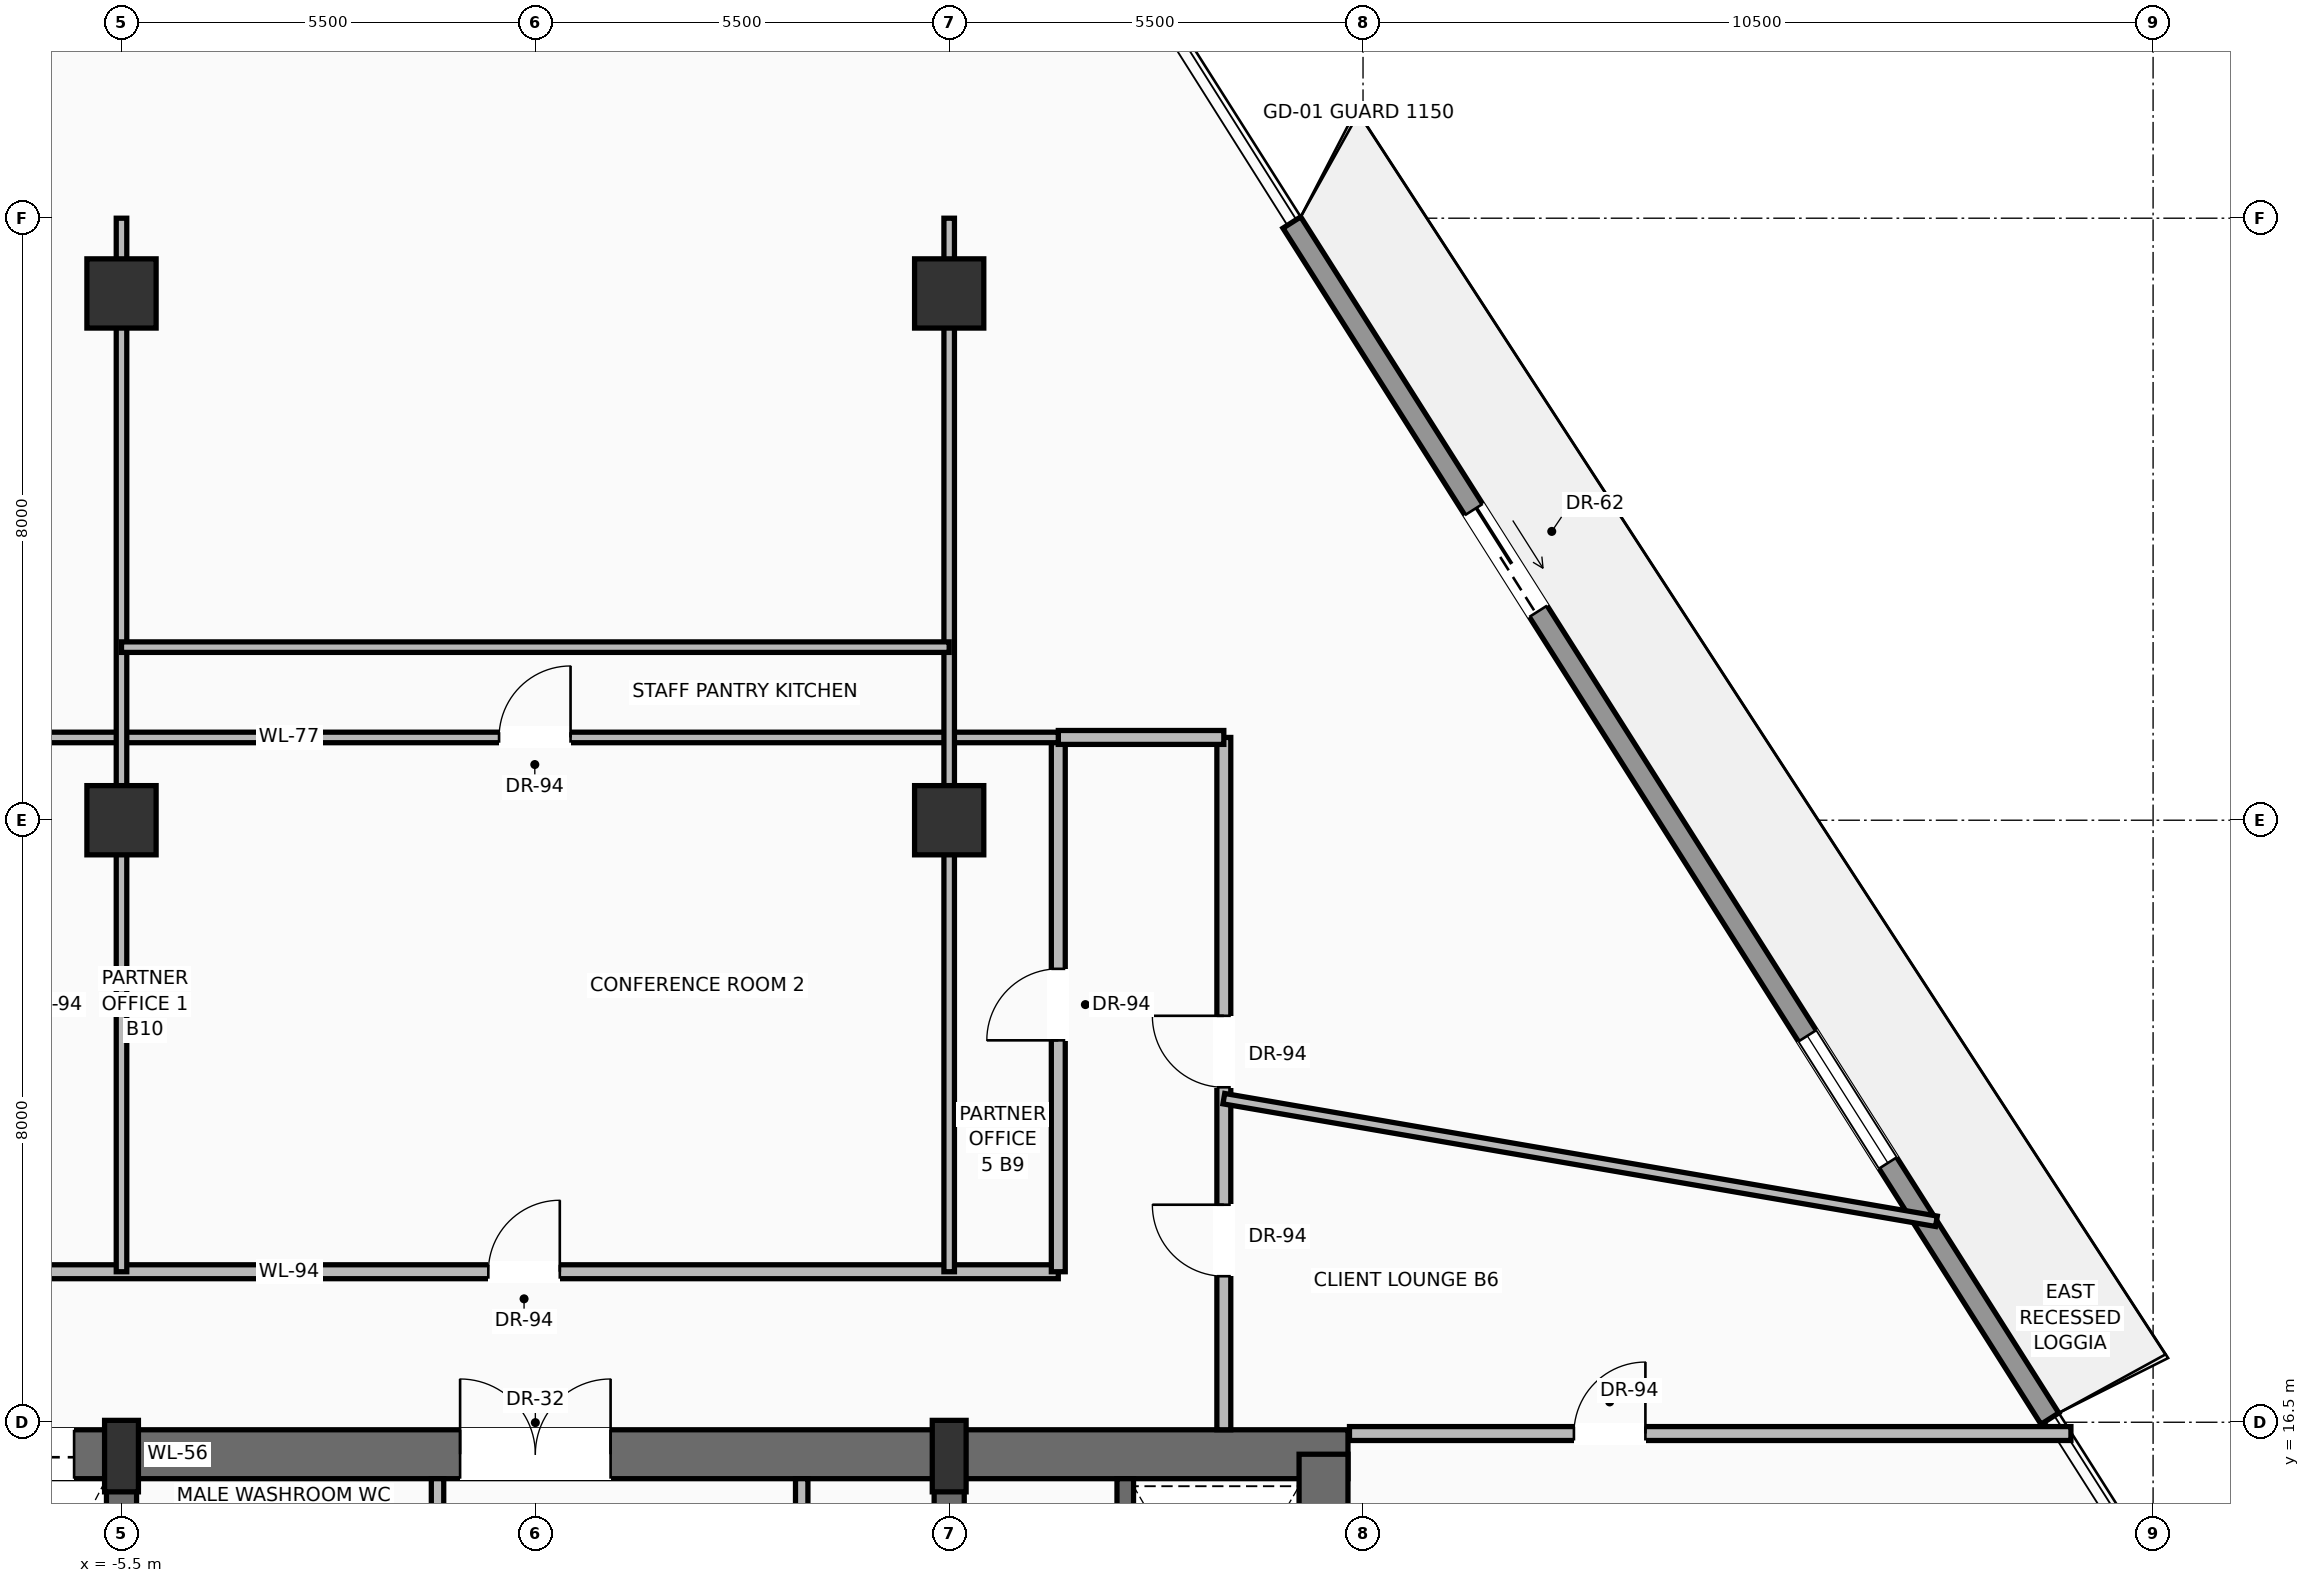
"""IFC4 building model, lengths in metres.
Left out: names, types, materials, properties, quantities, classifications, styles, units other than length and angle.
Written with IfcOpenShell. Run it as: python <this file> out.ifc"""

import sys

from ifc_helpers import new_model, si_unit, direction, frame, frame_2d, origin, origin_2d, place, context, subcontext, project, spatial, rectangle, extrude, source, transform, mapped, element, fill, save


model = new_model("IFC4")
c1 = context("Model", 3, precision=1e-05, world=origin(), true_north=direction((0.0, 1.0)))
c2 = subcontext(c1, "Body", "Model", "MODEL_VIEW")
j1 = project(units=[si_unit("LENGTHUNIT", "METRE"), si_unit("PLANEANGLEUNIT", "RADIAN")], contexts=[c1])
p1 = place(None, origin())
s1 = spatial("IfcSite", under=j1, at=p1, CompositionType="ELEMENT")
p2 = place(p1, origin())
s2 = spatial("IfcBuilding", under=s1, at=p2, CompositionType="ELEMENT")
p3 = place(p2, frame((0.0, 0.0, 182.1)))
s3 = spatial("IfcBuildingStorey", under=s2, at=p3, CompositionType="ELEMENT", Elevation=182.1)
p4 = place(p3, frame((-10.8, 16.075, 0.0), z_axis=(0.0, 0.0, 1.0), x_axis=(1.0, 0.0, 0.0)))
e1 = element("IfcWall", 1, at=p4, inside=s3, PredefinedType="SHEAR", context=c2, shape_type="SweptSolid", body=[
    extrude(rectangle(XDim=21.6, YDim=0.65, at=frame_2d((10.8, 0.0))), origin(), (0.0, 0.0, 1.0), 3.47),
])
p5 = place(p4, frame((3.37, 0.0, 0.0)))
e2 = element("IfcOpeningElement", 2, at=p5, cuts=e1, PredefinedType="OPENING", context=c2, shape_type="SweptSolid", body=[
    extrude(rectangle(XDim=1.3, YDim=2.3, at=frame_2d((0.65, 1.15))), frame((0.0, 0.335, 0.0), z_axis=(0.0, -1.0, 0.0), x_axis=(1.0, 0.0, 0.0)), (0.0, 0.0, 1.0), 0.67),
])
p6 = place(p4, frame((9.8, 0.0, 0.0)))
e3 = element("IfcOpeningElement", 3, at=p6, cuts=e1, PredefinedType="OPENING", context=c2, shape_type="SweptSolid", body=[
    extrude(rectangle(XDim=2.0, YDim=2.4, at=frame_2d((1.0, 1.2))), frame((0.0, 0.335, 0.0), z_axis=(0.0, -1.0, 0.0), x_axis=(1.0, 0.0, 0.0)), (0.0, 0.0, 1.0), 0.67),
])
p7 = place(p3, frame((10.475, 0.525, 0.0), z_axis=(0.0, 0.0, 1.0), x_axis=(0.0, 1.0, 0.0)))
e4 = element("IfcWall", 4, at=p7, inside=s3, PredefinedType="SHEAR", context=c2, shape_type="SweptSolid", body=[
    extrude(rectangle(XDim=15.55, YDim=0.65, at=frame_2d((7.775, 0.0))), origin(), (0.0, 0.0, 1.0), 3.47),
])
p8 = place(p3, frame((-5.5, 0.525, 0.0), z_axis=(0.0, 0.0, 1.0), x_axis=(0.0, 1.0, 0.0)))
e5 = element("IfcWall", 5, at=p8, inside=s3, PredefinedType="SHEAR", context=c2, shape_type="SweptSolid", body=[
    extrude(rectangle(XDim=15.55, YDim=0.4, at=frame_2d((7.775, 0.0))), origin(), (0.0, 0.0, 1.0), 3.47),
])
p9 = place(p8, frame((8.975, 0.0, 0.0)))
e6 = element("IfcOpeningElement", 6, at=p9, cuts=e5, PredefinedType="OPENING", context=c2, shape_type="SweptSolid", body=[
    extrude(rectangle(XDim=1.1, YDim=2.2, at=frame_2d((0.55, 1.1))), frame((0.0, 0.21, 0.0), z_axis=(0.0, -1.0, 0.0), x_axis=(1.0, 0.0, 0.0)), (0.0, 0.0, 1.0), 0.42),
])
p10 = place(p3, frame((5.5, 0.525, 0.0), z_axis=(0.0, 0.0, 1.0), x_axis=(0.0, 1.0, 0.0)))
e7 = element("IfcWall", 7, at=p10, inside=s3, PredefinedType="SHEAR", context=c2, shape_type="SweptSolid", body=[
    extrude(rectangle(XDim=15.55, YDim=0.4, at=frame_2d((7.775, 0.0))), origin(), (0.0, 0.0, 1.0), 3.47),
])
p11 = place(p10, frame((8.975, 0.0, 0.0)))
e8 = element("IfcOpeningElement", 8, at=p11, cuts=e7, PredefinedType="OPENING", context=c2, shape_type="SweptSolid", body=[
    extrude(rectangle(XDim=1.1, YDim=2.2, at=frame_2d((0.55, 1.1))), frame((0.0, 0.21, 0.0), z_axis=(0.0, -1.0, 0.0), x_axis=(1.0, 0.0, 0.0)), (0.0, 0.0, 1.0), 0.42),
])
m1 = source(origin(), c2, "Body", "SweptSolid", [
    extrude(rectangle(XDim=0.45, YDim=0.95, at=origin_2d()), origin(), (0.0, 0.0, 1.0), 3.7),
])
for number, where, z_axis, x_axis in (
    (9, (-5.5, 16.05, 0.0), (0.0, 0.0, 1.0), (1.0, 0.0, 0.0)),
    (10, (5.5, 16.05, 0.0), (0.0, 0.0, 1.0), (1.0, 0.0, 0.0)),
):
    element("IfcColumn", number, at=place(p3, frame(where, z_axis=z_axis, x_axis=x_axis)), inside=s3, PredefinedType="PILASTER", context=c2, shape_type="MappedRepresentation", body=[
        mapped(m1, transform((0.0, 0.0, 0.0), scale=1.0)),
    ])
m2 = source(origin(), c2, "Body", "SweptSolid", [
    extrude(rectangle(XDim=0.92, YDim=0.92, at=origin_2d()), origin(), (0.0, 0.0, 1.0), 3.7),
])
for number, where, z_axis, x_axis in (
    (11, (-5.5, 24.5, 0.0), (0.0, 0.0, 1.0), (1.0, 0.0, 0.0)),
    (12, (5.5, 24.5, 0.0), (0.0, 0.0, 1.0), (1.0, 0.0, 0.0)),
    (13, (-5.5, 31.5, 0.0), (0.0, 0.0, 1.0), (1.0, 0.0, 0.0)),
    (14, (5.5, 31.5, 0.0), (0.0, 0.0, 1.0), (1.0, 0.0, 0.0)),
):
    element("IfcColumn", number, at=place(p3, frame(where, z_axis=z_axis, x_axis=x_axis)), inside=s3, PredefinedType="COLUMN", context=c2, shape_type="MappedRepresentation", body=[
        mapped(m2, transform((0.0, 0.0, 0.0), scale=1.0)),
    ])
p12 = place(p3, frame((10.054, 32.443, 0.0), z_axis=(0.0, 0.0, 1.0), x_axis=(0.535358537379, -0.844624908735, 0.0)))
e15 = element("IfcWall", 15, at=p12, inside=s3, PredefinedType="SOLIDWALL", context=c2, shape_type="SweptSolid", body=[
    extrude(rectangle(XDim=18.818, YDim=0.28, at=frame_2d((9.409, 0.0))), origin(), (0.0, 0.0, 1.0), 3.05),
])
p13 = place(p12, frame((4.516, 0.0, 0.0)))
e16 = element("IfcOpeningElement", 16, at=p13, cuts=e15, PredefinedType="OPENING", context=c2, shape_type="SweptSolid", body=[
    extrude(rectangle(XDim=1.6, YDim=2.35, at=frame_2d((0.8, 1.175))), frame((0.0, 0.15, 0.0), z_axis=(0.0, -1.0, 0.0), x_axis=(1.0, 0.0, 0.0)), (0.0, 0.0, 1.0), 0.3),
])
p14 = place(p12, frame((12.796, 0.0, 0.9)))
e17 = element("IfcOpeningElement", 17, at=p14, cuts=e15, PredefinedType="OPENING", context=c2, shape_type="SweptSolid", body=[
    extrude(rectangle(XDim=2.0, YDim=1.85, at=frame_2d((1.0, 0.925))), frame((0.0, 0.15, 0.0), z_axis=(0.0, -1.0, 0.0), x_axis=(1.0, 0.0, 0.0)), (0.0, 0.0, 1.0), 0.3),
])
p15 = place(p3, frame((7.84, 11.87, 0.0), z_axis=(0.0, 0.0, 1.0), x_axis=(0.0, 1.0, 0.0)))
e18 = element("IfcWall", 18, at=p15, inside=s3, PredefinedType="SOLIDWALL", context=c2, shape_type="SweptSolid", body=[
    extrude(rectangle(XDim=3.88, YDim=0.22, at=frame_2d((1.94, 0.0))), origin(), (0.0, 0.0, 1.0), 3.47),
])
p16 = place(p3, frame((-1.3, 13.6, 0.0), z_axis=(0.0, 0.0, 1.0), x_axis=(0.0, 1.0, 0.0)))
e19 = element("IfcWall", 19, at=p16, inside=s3, PredefinedType="PARTITIONING", context=c2, shape_type="SweptSolid", body=[
    extrude(rectangle(XDim=2.15, YDim=0.165, at=frame_2d((1.075, 0.0))), origin(), (0.0, 0.0, 1.0), 3.462),
])
p17 = place(p16, frame((0.55, 0.0, 0.0)))
e20 = element("IfcOpeningElement", 20, at=p17, cuts=e19, PredefinedType="OPENING", context=c2, shape_type="SweptSolid", body=[
    extrude(rectangle(XDim=0.9, YDim=2.1, at=frame_2d((0.45, 1.05))), frame((0.0, 0.093, 0.0), z_axis=(0.0, -1.0, 0.0), x_axis=(1.0, 0.0, 0.0)), (0.0, 0.0, 1.0), 0.185),
])
p18 = place(p3, frame((3.54, 11.22, 0.0), z_axis=(0.0, 0.0, 1.0), x_axis=(0.0, 1.0, 0.0)))
e21 = element("IfcWall", 21, at=p18, inside=s3, PredefinedType="PARTITIONING", context=c2, shape_type="SweptSolid", body=[
    extrude(rectangle(XDim=4.53, YDim=0.165, at=frame_2d((2.265, 0.0))), origin(), (0.0, 0.0, 1.0), 3.462),
])
p19 = place(p18, frame((1.25, 0.0, 0.0)))
e22 = element("IfcOpeningElement", 22, at=p19, cuts=e21, PredefinedType="OPENING", context=c2, shape_type="SweptSolid", body=[
    extrude(rectangle(XDim=0.9, YDim=2.1, at=frame_2d((0.45, 1.05))), frame((0.0, 0.093, 0.0), z_axis=(0.0, -1.0, 0.0), x_axis=(1.0, 0.0, 0.0)), (0.0, 0.0, 1.0), 0.185),
])
p20 = place(p3, frame((-7.25, 18.5, 0.0), z_axis=(0.0, 0.0, 1.0), x_axis=(1.0, 0.0, 0.0)))
e23 = element("IfcWall", 23, at=p20, inside=s3, PredefinedType="PARTITIONING", context=c2, shape_type="SweptSolid", body=[
    extrude(rectangle(XDim=14.2, YDim=0.185, at=frame_2d((7.1, 0.0))), origin(), (0.0, 0.0, 1.0), 2.846),
])
p21 = place(p20, frame((6.625, 0.0, 0.0)))
e24 = element("IfcOpeningElement", 24, at=p21, cuts=e23, PredefinedType="OPENING", context=c2, shape_type="SweptSolid", body=[
    extrude(rectangle(XDim=0.95, YDim=2.2, at=frame_2d((0.475, 1.1))), frame((0.0, 0.103, 0.0), z_axis=(0.0, -1.0, 0.0), x_axis=(1.0, 0.0, 0.0)), (0.0, 0.0, 1.0), 0.205),
])
p22 = place(p3, frame((6.95, 18.5, 0.0), z_axis=(0.0, 0.0, 1.0), x_axis=(0.0, 1.0, 0.0)))
e25 = element("IfcWall", 25, at=p22, inside=s3, PredefinedType="PARTITIONING", context=c2, shape_type="SweptSolid", body=[
    extrude(rectangle(XDim=7.1, YDim=0.185, at=frame_2d((3.55, 0.0))), origin(), (0.0, 0.0, 1.0), 2.846),
])
p23 = place(p22, frame((3.075, 0.0, 0.0)))
e26 = element("IfcOpeningElement", 26, at=p23, cuts=e25, PredefinedType="OPENING", context=c2, shape_type="SweptSolid", body=[
    extrude(rectangle(XDim=0.95, YDim=2.2, at=frame_2d((0.475, 1.1))), frame((0.0, 0.103, 0.0), z_axis=(0.0, -1.0, 0.0), x_axis=(1.0, 0.0, 0.0)), (0.0, 0.0, 1.0), 0.205),
])
p24 = place(p3, frame((9.15, 16.4, 0.0), z_axis=(0.0, 0.0, 1.0), x_axis=(0.0, 1.0, 0.0)))
e27 = element("IfcWall", 27, at=p24, inside=s3, PredefinedType="PARTITIONING", context=c2, shape_type="SweptSolid", body=[
    extrude(rectangle(XDim=9.2, YDim=0.185, at=frame_2d((4.6, 0.0))), origin(), (0.0, 0.0, 1.0), 2.846),
])
p25 = place(p24, frame((4.551, 0.0, 0.0)))
e28 = element("IfcOpeningElement", 28, at=p25, cuts=e27, PredefinedType="OPENING", context=c2, shape_type="SweptSolid", body=[
    extrude(rectangle(XDim=0.95, YDim=2.2, at=frame_2d((0.475, 1.1))), frame((0.0, 0.103, 0.0), z_axis=(0.0, -1.0, 0.0), x_axis=(1.0, 0.0, 0.0)), (0.0, 0.0, 1.0), 0.205),
])
p26 = place(p24, frame((2.041, 0.0, 0.0)))
e29 = element("IfcOpeningElement", 29, at=p26, cuts=e27, PredefinedType="OPENING", context=c2, shape_type="SweptSolid", body=[
    extrude(rectangle(XDim=0.95, YDim=2.2, at=frame_2d((0.475, 1.1))), frame((0.0, 0.103, 0.0), z_axis=(0.0, -1.0, 0.0), x_axis=(1.0, 0.0, 0.0)), (0.0, 0.0, 1.0), 0.205),
])
p27 = place(p3, frame((6.95, 25.6, 0.0), z_axis=(0.0, 0.0, 1.0), x_axis=(1.0, 0.0, 0.0)))
e30 = element("IfcWall", 30, at=p27, inside=s3, PredefinedType="PARTITIONING", context=c2, shape_type="SweptSolid", body=[
    extrude(rectangle(XDim=2.2, YDim=0.185, at=frame_2d((1.1, 0.0))), origin(), (0.0, 0.0, 1.0), 3.462),
])
p28 = place(p3, frame((10.82, 16.35, 0.0), z_axis=(0.0, 0.0, 1.0), x_axis=(1.0, 0.0, 0.0)))
e31 = element("IfcWall", 31, at=p28, inside=s3, PredefinedType="PARTITIONING", context=c2, shape_type="SweptSolid", body=[
    extrude(rectangle(XDim=9.588, YDim=0.185, at=frame_2d((4.794, 0.0))), origin(), (0.0, 0.0, 1.0), 3.462),
])
p29 = place(p28, frame((2.983, 0.0, 0.0)))
e32 = element("IfcOpeningElement", 32, at=p29, cuts=e31, PredefinedType="OPENING", context=c2, shape_type="SweptSolid", body=[
    extrude(rectangle(XDim=0.95, YDim=2.2, at=frame_2d((0.475, 1.1))), frame((0.0, 0.103, 0.0), z_axis=(0.0, -1.0, 0.0), x_axis=(1.0, 0.0, 0.0)), (0.0, 0.0, 1.0), 0.205),
])
p30 = place(p3, frame((-7.25, 25.6, 0.0), z_axis=(0.0, 0.0, 1.0), x_axis=(1.0, 0.0, 0.0)))
e33 = element("IfcWall", 33, at=p30, inside=s3, PredefinedType="PARTITIONING", context=c2, shape_type="SweptSolid", body=[
    extrude(rectangle(XDim=14.2, YDim=0.14, at=frame_2d((7.1, 0.0))), origin(), (0.0, 0.0, 1.0), 3.462),
])
p31 = place(p30, frame((6.768, 0.0, 0.0)))
e34 = element("IfcOpeningElement", 34, at=p31, cuts=e33, PredefinedType="OPENING", context=c2, shape_type="SweptSolid", body=[
    extrude(rectangle(XDim=0.95, YDim=2.2, at=frame_2d((0.475, 1.1))), frame((0.0, 0.08, 0.0), z_axis=(0.0, -1.0, 0.0), x_axis=(1.0, 0.0, 0.0)), (0.0, 0.0, 1.0), 0.16),
])
for number, where, z_axis, x_axis in (
    (35, (-5.5, 18.5, 0.0), (0.0, 0.0, 1.0), (0.0, 1.0, 0.0)),
    (36, (5.5, 18.5, 0.0), (0.0, 0.0, 1.0), (0.0, 1.0, 0.0)),
):
    element("IfcWall", number, at=place(p3, frame(where, z_axis=z_axis, x_axis=x_axis)), inside=s3, PredefinedType="PARTITIONING", context=c2, shape_type="SweptSolid", body=[
        extrude(rectangle(XDim=14.0, YDim=0.14, at=frame_2d((7.0, 0.0))), origin(), (0.0, 0.0, 1.0), 2.846),
    ])
p32 = place(p3, frame((-5.5, 26.8, 0.0), z_axis=(0.0, 0.0, 1.0), x_axis=(1.0, 0.0, 0.0)))
e37 = element("IfcWall", 37, at=p32, inside=s3, PredefinedType="PARTITIONING", context=c2, shape_type="SweptSolid", body=[
    extrude(rectangle(XDim=11.0, YDim=0.14, at=frame_2d((5.5, 0.0))), origin(), (0.0, 0.0, 1.0), 3.462),
])
p33 = place(p3, frame((9.15, 20.8, 0.0), z_axis=(0.0, 0.0, 1.0), x_axis=(0.985515802889, -0.169583614351, 0.0)))
e38 = element("IfcWall", 38, at=p33, inside=s3, PredefinedType="PARTITIONING", context=c2, shape_type="SweptSolid", body=[
    extrude(rectangle(XDim=9.61, YDim=0.14, at=frame_2d((4.805, 0.0))), origin(), (0.0, 0.0, 1.0), 3.049),
])
m3 = source(origin(), c2, "Body", "SweptSolid", [
    extrude(rectangle(XDim=1.6, YDim=2.35, at=frame_2d((0.8, 1.175))), frame((0.0, 0.025, 0.0), z_axis=(0.0, -1.0, 0.0), x_axis=(1.0, 0.0, 0.0)), (0.0, 0.0, 1.0), 0.05),
])
p34 = place(p13, origin())
e39 = element("IfcDoor", 39, at=p34, inside=s3, OperationType="SLIDING_TO_RIGHT", PredefinedType="DOOR", context=c2, shape_type="MappedRepresentation", body=[
    mapped(m3, transform((0.0, 0.0, 0.0), scale=1.0)),
])
fill(e16, e39)
m4 = source(origin(), c2, "Body", "SweptSolid", [
    extrude(rectangle(XDim=2.0, YDim=1.85, at=frame_2d((1.0, 0.925))), frame((0.0, 0.03, 0.0), z_axis=(0.0, -1.0, 0.0), x_axis=(1.0, 0.0, 0.0)), (0.0, 0.0, 1.0), 0.06),
])
p35 = place(p14, origin())
e40 = element("IfcWindow", 40, at=p35, inside=s3, PartitioningType="SINGLE_PANEL", PredefinedType="WINDOW", context=c2, shape_type="MappedRepresentation", body=[
    mapped(m4, transform((0.0, 0.0, 0.0), scale=1.0)),
])
fill(e17, e40)
m5 = source(origin(), c2, "Body", "SweptSolid", [
    extrude(rectangle(XDim=1.3, YDim=2.3, at=frame_2d((0.65, 1.15))), frame((0.0, 0.025, 0.0), z_axis=(0.0, -1.0, 0.0), x_axis=(1.0, 0.0, 0.0)), (0.0, 0.0, 1.0), 0.05),
])
p36 = place(p5, origin())
e41 = element("IfcDoor", 41, at=p36, inside=s3, OperationType="SLIDING_TO_RIGHT", PredefinedType="DOOR", context=c2, shape_type="MappedRepresentation", body=[
    mapped(m5, transform((0.0, 0.0, 0.0), scale=1.0)),
])
fill(e2, e41)
m6 = source(origin(), c2, "Body", "SweptSolid", [
    extrude(rectangle(XDim=2.0, YDim=2.4, at=frame_2d((1.0, 1.2))), frame((0.0, 0.025, 0.0), z_axis=(0.0, -1.0, 0.0), x_axis=(1.0, 0.0, 0.0)), (0.0, 0.0, 1.0), 0.05),
])
p37 = place(p6, origin())
e42 = element("IfcDoor", 42, at=p37, inside=s3, OperationType="DOUBLE_DOOR_SINGLE_SWING", PredefinedType="DOOR", context=c2, shape_type="MappedRepresentation", body=[
    mapped(m6, transform((0.0, 0.0, 0.0), scale=1.0)),
])
fill(e3, e42)
m7 = source(origin(), c2, "Body", "SweptSolid", [
    extrude(rectangle(XDim=0.95, YDim=2.2, at=frame_2d((0.475, 1.1))), frame((0.0, 0.025, 0.0), z_axis=(0.0, -1.0, 0.0), x_axis=(1.0, 0.0, 0.0)), (0.0, 0.0, 1.0), 0.05),
])
p38 = place(p21, origin())
e43 = element("IfcDoor", 43, at=p38, inside=s3, OperationType="SINGLE_SWING_RIGHT", PredefinedType="DOOR", context=c2, shape_type="MappedRepresentation", body=[
    mapped(m7, transform((0.0, 0.0, 0.0), scale=1.0)),
])
fill(e24, e43)
p39 = place(p25, origin())
e44 = element("IfcDoor", 44, at=p39, inside=s3, OperationType="SINGLE_SWING_RIGHT", PredefinedType="DOOR", context=c2, shape_type="MappedRepresentation", body=[
    mapped(m7, transform((0.0, 0.0, 0.0), scale=1.0)),
])
fill(e28, e44)
p40 = place(p29, origin())
e45 = element("IfcDoor", 45, at=p40, inside=s3, OperationType="SINGLE_SWING_RIGHT", PredefinedType="DOOR", context=c2, shape_type="MappedRepresentation", body=[
    mapped(m7, transform((0.0, 0.0, 0.0), scale=1.0)),
])
fill(e32, e45)
p41 = place(p26, origin())
e46 = element("IfcDoor", 46, at=p41, inside=s3, OperationType="SINGLE_SWING_RIGHT", PredefinedType="DOOR", context=c2, shape_type="MappedRepresentation", body=[
    mapped(m7, transform((0.0, 0.0, 0.0), scale=1.0)),
])
fill(e29, e46)
p42 = place(p23, origin())
e47 = element("IfcDoor", 47, at=p42, inside=s3, OperationType="SINGLE_SWING_LEFT", PredefinedType="DOOR", context=c2, shape_type="MappedRepresentation", body=[
    mapped(m7, transform((0.0, 0.0, 0.0), scale=1.0)),
])
fill(e26, e47)
p43 = place(p31, origin())
e48 = element("IfcDoor", 48, at=p43, inside=s3, OperationType="SINGLE_SWING_RIGHT", PredefinedType="DOOR", context=c2, shape_type="MappedRepresentation", body=[
    mapped(m7, transform((0.0, 0.0, 0.0), scale=1.0)),
])
fill(e34, e48)
save(model, sys.argv[1])
